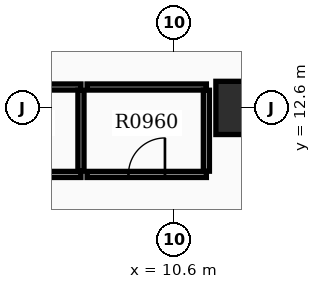
"""IFC4 building model, lengths in metres.
Left out: names, types, materials, properties, quantities, classifications, styles, units other than length and angle.
Written with IfcOpenShell. Run it as: python <this file> out.ifc"""

import sys

from ifc_helpers import new_model, si_unit, direction, frame, frame_2d, origin, origin_2d, place, context, subcontext, project, spatial, rectangle, extrude, element, fill, save


model = new_model("IFC4")
c1 = context("Model", 3, precision=1e-05, world=origin(), true_north=direction((0.0, 1.0)))
c2 = subcontext(c1, "Body", "Model", "MODEL_VIEW")
j1 = project(units=[si_unit("LENGTHUNIT", "METRE"), si_unit("PLANEANGLEUNIT", "RADIAN")], contexts=[c1])
p1 = place(None, origin())
s1 = spatial("IfcSite", under=j1, at=p1, CompositionType="ELEMENT")
p2 = place(p1, origin())
s2 = spatial("IfcBuilding", under=s1, at=p2, CompositionType="ELEMENT")
p3 = place(p2, frame((0.0, 0.0, 63.9)))
s3 = spatial("IfcBuildingStorey", under=s2, at=p3, CompositionType="ELEMENT", Elevation=63.9)
p4 = place(p3, frame((12.4, 12.6, 0.0), z_axis=(0.0, 0.0, 1.0), x_axis=(1.0, 0.0, 0.0)))
e1 = element("IfcColumn", 1, at=p4, inside=s3, PredefinedType="COLUMN", context=c2, shape_type="SweptSolid", body=[
    extrude(rectangle(XDim=1.4, YDim=1.4, at=origin_2d()), origin(), (0.0, 0.0, 1.0), 3.9),
])
p5 = place(p3, frame((4.95, 10.85, 0.0), z_axis=(0.0, 0.0, 1.0), x_axis=(1.0, 0.0, 0.0)))
e2 = element("IfcWall", 2, at=p5, inside=s3, PredefinedType="PARTITIONING", context=c2, shape_type="SweptSolid", body=[
    extrude(rectangle(XDim=3.2, YDim=0.16, at=frame_2d((1.6, 0.0))), origin(), (0.0, 0.0, 1.0), 2.9),
])
p6 = place(p5, frame((1.12, 0.0, 0.0)))
e3 = element("IfcOpeningElement", 3, at=p6, cuts=e2, PredefinedType="OPENING", context=c2, shape_type="SweptSolid", body=[
    extrude(rectangle(XDim=0.96, YDim=2.15, at=frame_2d((0.48, 1.075))), frame((0.0, 0.09, 0.0), z_axis=(0.0, -1.0, 0.0), x_axis=(1.0, 0.0, 0.0)), (0.0, 0.0, 1.0), 0.18),
])
p7 = place(p3, frame((4.95, 13.15, 0.0), z_axis=(0.0, 0.0, 1.0), x_axis=(1.0, 0.0, 0.0)))
e4 = element("IfcWall", 4, at=p7, inside=s3, PredefinedType="PARTITIONING", context=c2, shape_type="SweptSolid", body=[
    extrude(rectangle(XDim=3.2, YDim=0.16, at=frame_2d((1.6, 0.0))), origin(), (0.0, 0.0, 1.0), 2.9),
])
p8 = place(p3, frame((8.15, 10.935, 0.0), z_axis=(0.0, 0.0, 1.0), x_axis=(0.0, 1.0, 0.0)))
e5 = element("IfcWall", 5, at=p8, inside=s3, PredefinedType="PARTITIONING", context=c2, shape_type="SweptSolid", body=[
    extrude(rectangle(XDim=2.13, YDim=0.16, at=frame_2d((1.065, 0.0))), origin(), (0.0, 0.0, 1.0), 2.9),
])
p9 = place(p3, frame((8.31, 10.85, 0.0), z_axis=(0.0, 0.0, 1.0), x_axis=(1.0, 0.0, 0.0)))
e6 = element("IfcWall", 6, at=p9, inside=s3, PredefinedType="PARTITIONING", context=c2, shape_type="SweptSolid", body=[
    extrude(rectangle(XDim=3.14, YDim=0.16, at=frame_2d((1.57, 0.0))), origin(), (0.0, 0.0, 1.0), 2.9),
])
p10 = place(p9, frame((1.09, 0.0, 0.0)))
e7 = element("IfcOpeningElement", 7, at=p10, cuts=e6, PredefinedType="OPENING", context=c2, shape_type="SweptSolid", body=[
    extrude(rectangle(XDim=0.96, YDim=2.15, at=frame_2d((0.48, 1.075))), frame((0.0, 0.09, 0.0), z_axis=(0.0, -1.0, 0.0), x_axis=(1.0, 0.0, 0.0)), (0.0, 0.0, 1.0), 0.18),
])
p11 = place(p3, frame((8.31, 13.15, 0.0), z_axis=(0.0, 0.0, 1.0), x_axis=(1.0, 0.0, 0.0)))
e8 = element("IfcWall", 8, at=p11, inside=s3, PredefinedType="PARTITIONING", context=c2, shape_type="SweptSolid", body=[
    extrude(rectangle(XDim=3.14, YDim=0.16, at=frame_2d((1.57, 0.0))), origin(), (0.0, 0.0, 1.0), 2.9),
])
p12 = place(p3, frame((11.45, 10.935, 0.0), z_axis=(0.0, 0.0, 1.0), x_axis=(0.0, 1.0, 0.0)))
e9 = element("IfcWall", 9, at=p12, inside=s3, PredefinedType="PARTITIONING", context=c2, shape_type="SweptSolid", body=[
    extrude(rectangle(XDim=2.13, YDim=0.16, at=frame_2d((1.065, 0.0))), origin(), (0.0, 0.0, 1.0), 2.9),
])
p13 = place(p10, origin())
e10 = element("IfcDoor", 10, at=p13, inside=s3, OperationType="SINGLE_SWING_RIGHT", PredefinedType="DOOR", context=c2, shape_type="SweptSolid", body=[
    extrude(rectangle(XDim=0.96, YDim=2.15, at=frame_2d((0.48, 1.075))), frame((0.0, 0.025, 0.0), z_axis=(0.0, -1.0, 0.0), x_axis=(1.0, 0.0, 0.0)), (0.0, 0.0, 1.0), 0.05),
])
fill(e7, e10)
save(model, sys.argv[1])
